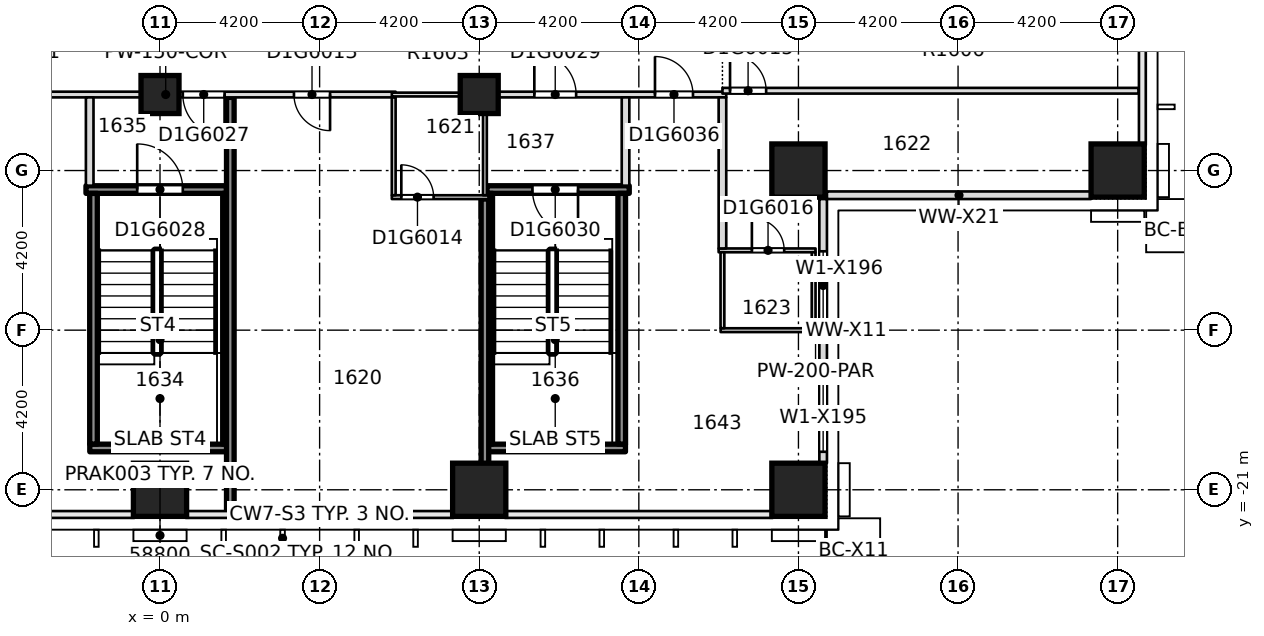
"""IFC4 building model, lengths in metres.
Left out: names, types, materials, properties, quantities, classifications, styles, units other than length and angle.
Written with IfcOpenShell. Run it as: python <this file> out.ifc"""

import sys

from ifc_helpers import new_model, si_unit, direction, frame, frame_2d, origin, origin_2d, place, context, subcontext, project, spatial, rectangle, extrude, element, fill, save


model = new_model("IFC4")
c1 = context("Model", 3, precision=1e-05, world=origin(), true_north=direction((0.0, 1.0)))
c2 = subcontext(c1, "Body", "Model", "MODEL_VIEW")
j1 = project(units=[si_unit("LENGTHUNIT", "METRE"), si_unit("PLANEANGLEUNIT", "RADIAN")], contexts=[c1])
p1 = place(None, origin())
s1 = spatial("IfcSite", under=j1, at=p1, CompositionType="ELEMENT")
p2 = place(p1, origin())
s2 = spatial("IfcBuilding", under=s1, at=p2, CompositionType="ELEMENT")
p3 = place(p2, frame((0.0, 0.0, 69.0)))
s3 = spatial("IfcBuildingStorey", under=s2, at=p3, CompositionType="ELEMENT", Elevation=69.0)
for number, where, z_axis, x_axis in (
    (1, (0.0, -21.0, -0.32), (0.0, 0.0, 1.0), (1.0, 0.0, 0.0)),
    (2, (8.4, -21.0, -0.32), (0.0, 0.0, 1.0), (1.0, 0.0, 0.0)),
    (3, (16.8, -21.0, -0.32), (0.0, 0.0, 1.0), (1.0, 0.0, 0.0)),
    (4, (16.8, -12.6, -0.32), (0.0, 0.0, 1.0), (1.0, 0.0, 0.0)),
    (5, (25.2, -12.6, -0.32), (0.0, 0.0, 1.0), (1.0, 0.0, 0.0)),
):
    element("IfcColumn", number, at=place(p3, frame(where, z_axis=z_axis, x_axis=x_axis)), inside=s3, PredefinedType="COLUMN", context=c2, shape_type="SweptSolid", body=[
        extrude(rectangle(XDim=1.4, YDim=1.4, at=origin_2d()), origin(), (0.0, 0.0, 1.0), 3.45),
    ])
for number, where, z_axis, x_axis in (
    (6, (0.0, -10.6, -0.32), (0.0, 0.0, 1.0), (1.0, 0.0, 0.0)),
    (7, (8.4, -10.6, -0.32), (0.0, 0.0, 1.0), (1.0, 0.0, 0.0)),
):
    element("IfcColumn", number, at=place(p3, frame(where, z_axis=z_axis, x_axis=x_axis)), inside=s3, PredefinedType="COLUMN", context=c2, shape_type="SweptSolid", body=[
        extrude(rectangle(XDim=1.0, YDim=1.0, at=origin_2d()), origin(), (0.0, 0.0, 1.0), 3.45),
    ])
p4 = place(p3, frame((-1.848, -19.9, 0.0), z_axis=(0.0, 0.0, 1.0), x_axis=(1.0, 0.0, 0.0)))
e8 = element("IfcWall", 8, at=p4, inside=s3, PredefinedType="SOLIDWALL", context=c2, shape_type="SweptSolid", body=[
    extrude(rectangle(XDim=3.696, YDim=0.2, at=frame_2d((1.848, 0.0))), origin(), (0.0, 0.0, 1.0), 3.13),
])
p5 = place(p3, frame((8.552, -19.9, 0.0), z_axis=(0.0, 0.0, 1.0), x_axis=(1.0, 0.0, 0.0)))
e9 = element("IfcWall", 9, at=p5, inside=s3, PredefinedType="SOLIDWALL", context=c2, shape_type="SweptSolid", body=[
    extrude(rectangle(XDim=3.696, YDim=0.2, at=frame_2d((1.848, 0.0))), origin(), (0.0, 0.0, 1.0), 3.13),
])
p6 = place(p3, frame((14.752, -16.8, 0.0), z_axis=(0.0, 0.0, 1.0), x_axis=(1.0, 0.0, 0.0)))
e10 = element("IfcWall", 10, at=p6, inside=s3, PredefinedType="PARTITIONING", context=c2, shape_type="SweptSolid", body=[
    extrude(rectangle(XDim=2.498, YDim=0.1, at=frame_2d((1.249, 0.0))), origin(), (0.0, 0.0, 1.0), 3.13),
])
p7 = place(p3, frame((17.15, -16.8, 0.0), z_axis=(0.0, 0.0, 1.0), x_axis=(1.0, 0.0, 0.0)))
e11 = element("IfcWall", 11, at=p7, inside=s3, PredefinedType="PARTITIONING", context=c2, shape_type="SweptSolid", body=[
    extrude(rectangle(XDim=0.2, YDim=0.2, at=frame_2d((0.1, 0.0))), origin(), (0.0, 0.0, 1.0), 3.13),
])
p8 = place(p3, frame((14.7, -14.7, 0.0), z_axis=(0.0, 0.0, 1.0), x_axis=(1.0, 0.0, 0.0)))
e12 = element("IfcWall", 12, at=p8, inside=s3, PredefinedType="PARTITIONING", context=c2, shape_type="SweptSolid", body=[
    extrude(rectangle(XDim=2.55, YDim=0.1, at=frame_2d((1.275, 0.0))), origin(), (0.0, 0.0, 1.0), 3.13),
])
p9 = place(p8, frame((0.875, 0.0, 0.0)))
e13 = element("IfcOpeningElement", 13, at=p9, cuts=e12, PredefinedType="OPENING", context=c2, shape_type="SweptSolid", body=[
    extrude(rectangle(XDim=0.85, YDim=2.1, at=frame_2d((0.425, 1.05))), frame((0.0, 0.06, 0.0), z_axis=(0.0, -1.0, 0.0), x_axis=(1.0, 0.0, 0.0)), (0.0, 0.0, 1.0), 0.12),
])
p10 = place(p3, frame((6.1, -13.3, 0.0), z_axis=(0.0, 0.0, 1.0), x_axis=(1.0, 0.0, 0.0)))
e14 = element("IfcWall", 14, at=p10, inside=s3, PredefinedType="PARTITIONING", context=c2, shape_type="SweptSolid", body=[
    extrude(rectangle(XDim=2.55, YDim=0.1, at=frame_2d((1.275, 0.0))), origin(), (0.0, 0.0, 1.0), 3.13),
])
p11 = place(p10, frame((0.25, 0.0, 0.0)))
e15 = element("IfcOpeningElement", 15, at=p11, cuts=e14, PredefinedType="OPENING", context=c2, shape_type="SweptSolid", body=[
    extrude(rectangle(XDim=0.85, YDim=2.1, at=frame_2d((0.425, 1.05))), frame((0.0, 0.06, 0.0), z_axis=(0.0, -1.0, 0.0), x_axis=(1.0, 0.0, 0.0)), (0.0, 0.0, 1.0), 0.12),
])
p12 = place(p3, frame((-1.948, -13.1, 0.0), z_axis=(0.0, 0.0, 1.0), x_axis=(1.0, 0.0, 0.0)))
e16 = element("IfcWall", 16, at=p12, inside=s3, PredefinedType="SOLIDWALL", context=c2, shape_type="SweptSolid", body=[
    extrude(rectangle(XDim=3.696, YDim=0.2, at=frame_2d((1.848, 0.0))), origin(), (0.0, 0.0, 1.0), 3.13),
])
p13 = place(p12, frame((1.348, 0.0, 0.0)))
e17 = element("IfcOpeningElement", 17, at=p13, cuts=e16, PredefinedType="OPENING", context=c2, shape_type="SweptSolid", body=[
    extrude(rectangle(XDim=1.2, YDim=2.1, at=frame_2d((0.6, 1.05))), frame((0.0, 0.11, 0.0), z_axis=(0.0, -1.0, 0.0), x_axis=(1.0, 0.0, 0.0)), (0.0, 0.0, 1.0), 0.22),
])
p14 = place(p3, frame((8.602, -13.1, 0.0), z_axis=(0.0, 0.0, 1.0), x_axis=(1.0, 0.0, 0.0)))
e18 = element("IfcWall", 18, at=p14, inside=s3, PredefinedType="SOLIDWALL", context=c2, shape_type="SweptSolid", body=[
    extrude(rectangle(XDim=3.746, YDim=0.2, at=frame_2d((1.873, 0.0))), origin(), (0.0, 0.0, 1.0), 3.13),
])
p15 = place(p14, frame((1.198, 0.0, 0.0)))
e19 = element("IfcOpeningElement", 19, at=p15, cuts=e18, PredefinedType="OPENING", context=c2, shape_type="SweptSolid", body=[
    extrude(rectangle(XDim=1.2, YDim=2.1, at=frame_2d((0.6, 1.05))), frame((0.0, 0.11, 0.0), z_axis=(0.0, -1.0, 0.0), x_axis=(1.0, 0.0, 0.0)), (0.0, 0.0, 1.0), 0.22),
])
p16 = place(p3, frame((-5.9, -10.6, 0.0), z_axis=(0.0, 0.0, 1.0), x_axis=(1.0, 0.0, 0.0)))
e20 = element("IfcWall", 20, at=p16, inside=s3, PredefinedType="PARTITIONING", context=c2, shape_type="SweptSolid", body=[
    extrude(rectangle(XDim=12.1, YDim=0.15, at=frame_2d((6.05, 0.0))), origin(), (0.0, 0.0, 1.0), 3.13),
])
p17 = place(p16, frame((1.575, 0.0, 0.0)))
e21 = element("IfcOpeningElement", 21, at=p17, cuts=e20, PredefinedType="OPENING", context=c2, shape_type="SweptSolid", body=[
    extrude(rectangle(XDim=0.95, YDim=2.1, at=frame_2d((0.475, 1.05))), frame((0.0, 0.085, 0.0), z_axis=(0.0, -1.0, 0.0), x_axis=(1.0, 0.0, 0.0)), (0.0, 0.0, 1.0), 0.17),
])
p18 = place(p16, frame((9.425, 0.0, 0.0)))
e22 = element("IfcOpeningElement", 22, at=p18, cuts=e20, PredefinedType="OPENING", context=c2, shape_type="SweptSolid", body=[
    extrude(rectangle(XDim=0.95, YDim=2.1, at=frame_2d((0.475, 1.05))), frame((0.0, 0.085, 0.0), z_axis=(0.0, -1.0, 0.0), x_axis=(1.0, 0.0, 0.0)), (0.0, 0.0, 1.0), 0.17),
])
p19 = place(p16, frame((6.5, 0.0, 0.0)))
e23 = element("IfcOpeningElement", 23, at=p19, cuts=e20, PredefinedType="OPENING", context=c2, shape_type="SweptSolid", body=[
    extrude(rectangle(XDim=1.1, YDim=2.1, at=frame_2d((0.55, 1.05))), frame((0.0, 0.085, 0.0), z_axis=(0.0, -1.0, 0.0), x_axis=(1.0, 0.0, 0.0)), (0.0, 0.0, 1.0), 0.17),
])
p20 = place(p3, frame((6.1, -10.6, 0.0), z_axis=(0.0, 0.0, 1.0), x_axis=(1.0, 0.0, 0.0)))
e24 = element("IfcWall", 24, at=p20, inside=s3, PredefinedType="PARTITIONING", context=c2, shape_type="SweptSolid", body=[
    extrude(rectangle(XDim=2.5, YDim=0.1, at=frame_2d((1.25, 0.0))), origin(), (0.0, 0.0, 1.0), 3.13),
])
p21 = place(p3, frame((8.5, -10.6, 0.0), z_axis=(0.0, 0.0, 1.0), x_axis=(1.0, 0.0, 0.0)))
e25 = element("IfcWall", 25, at=p21, inside=s3, PredefinedType="PARTITIONING", context=c2, shape_type="SweptSolid", body=[
    extrude(rectangle(XDim=6.4, YDim=0.15, at=frame_2d((3.2, 0.0))), origin(), (0.0, 0.0, 1.0), 3.13),
])
p22 = place(p21, frame((1.35, 0.0, 0.0)))
e26 = element("IfcOpeningElement", 26, at=p22, cuts=e25, PredefinedType="OPENING", context=c2, shape_type="SweptSolid", body=[
    extrude(rectangle(XDim=1.1, YDim=2.1, at=frame_2d((0.55, 1.05))), frame((0.0, 0.085, 0.0), z_axis=(0.0, -1.0, 0.0), x_axis=(1.0, 0.0, 0.0)), (0.0, 0.0, 1.0), 0.17),
])
p23 = place(p21, frame((4.525, 0.0, 0.0)))
e27 = element("IfcOpeningElement", 27, at=p23, cuts=e25, PredefinedType="OPENING", context=c2, shape_type="SweptSolid", body=[
    extrude(rectangle(XDim=1.0, YDim=2.1, at=frame_2d((0.5, 1.05))), frame((0.0, 0.085, 0.0), z_axis=(0.0, -1.0, 0.0), x_axis=(1.0, 0.0, 0.0)), (0.0, 0.0, 1.0), 0.17),
])
p24 = place(p3, frame((14.8, -10.5, 0.0), z_axis=(0.0, 0.0, 1.0), x_axis=(1.0, 0.0, 0.0)))
e28 = element("IfcWall", 28, at=p24, inside=s3, PredefinedType="PARTITIONING", context=c2, shape_type="SweptSolid", body=[
    extrude(rectangle(XDim=10.95, YDim=0.15, at=frame_2d((5.475, 0.0))), origin(), (0.0, 0.0, 1.0), 3.13),
])
p25 = place(p24, frame((0.2, 0.0, 0.0)))
e29 = element("IfcOpeningElement", 29, at=p25, cuts=e28, PredefinedType="OPENING", context=c2, shape_type="SweptSolid", body=[
    extrude(rectangle(XDim=0.95, YDim=2.1, at=frame_2d((0.475, 1.05))), frame((0.0, 0.085, 0.0), z_axis=(0.0, -1.0, 0.0), x_axis=(1.0, 0.0, 0.0)), (0.0, 0.0, 1.0), 0.17),
])
p26 = place(p3, frame((-1.85, -12.998, 0.0), z_axis=(0.0, 0.0, 1.0), x_axis=(0.0, 1.0, 0.0)))
e30 = element("IfcWall", 30, at=p26, inside=s3, PredefinedType="PARTITIONING", context=c2, shape_type="SweptSolid", body=[
    extrude(rectangle(XDim=2.323, YDim=0.2, at=frame_2d((1.162, 0.0))), origin(), (0.0, 0.0, 1.0), 3.13),
])
for number, where, z_axis, x_axis in (
    (31, (-1.75, -19.798, 0.0), (0.0, 0.0, 1.0), (0.0, 1.0, 0.0)),
    (32, (1.75, -19.798, 0.0), (0.0, 0.0, 1.0), (0.0, 1.0, 0.0)),
):
    element("IfcWall", number, at=place(p3, frame(where, z_axis=z_axis, x_axis=x_axis)), inside=s3, PredefinedType="SOLIDWALL", context=c2, shape_type="SweptSolid", body=[
        extrude(rectangle(XDim=6.596, YDim=0.2, at=frame_2d((3.298, 0.0))), origin(), (0.0, 0.0, 1.0), 3.13),
    ])
for number, where, z_axis, x_axis in (
    (33, (6.15, -13.25, 0.0), (0.0, 0.0, 1.0), (0.0, 1.0, 0.0)),
    (34, (8.55, -13.25, 0.0), (0.0, 0.0, 1.0), (0.0, 1.0, 0.0)),
):
    element("IfcWall", number, at=place(p3, frame(where, z_axis=z_axis, x_axis=x_axis)), inside=s3, PredefinedType="PARTITIONING", context=c2, shape_type="SweptSolid", body=[
        extrude(rectangle(XDim=2.575, YDim=0.1, at=frame_2d((1.288, 0.0))), origin(), (0.0, 0.0, 1.0), 3.13),
    ])
for number, where, z_axis, x_axis in (
    (35, (8.65, -19.798, 0.0), (0.0, 0.0, 1.0), (0.0, 1.0, 0.0)),
    (36, (12.15, -19.798, 0.0), (0.0, 0.0, 1.0), (0.0, 1.0, 0.0)),
):
    element("IfcWall", number, at=place(p3, frame(where, z_axis=z_axis, x_axis=x_axis)), inside=s3, PredefinedType="SOLIDWALL", context=c2, shape_type="SweptSolid", body=[
        extrude(rectangle(XDim=6.596, YDim=0.2, at=frame_2d((3.298, 0.0))), origin(), (0.0, 0.0, 1.0), 3.13),
    ])
p27 = place(p3, frame((12.25, -12.998, 0.0), z_axis=(0.0, 0.0, 1.0), x_axis=(0.0, 1.0, 0.0)))
e37 = element("IfcWall", 37, at=p27, inside=s3, PredefinedType="PARTITIONING", context=c2, shape_type="SweptSolid", body=[
    extrude(rectangle(XDim=2.323, YDim=0.2, at=frame_2d((1.162, 0.0))), origin(), (0.0, 0.0, 1.0), 3.13),
])
p28 = place(p3, frame((14.8, -16.748, 0.0), z_axis=(0.0, 0.0, 1.0), x_axis=(0.0, 1.0, 0.0)))
e38 = element("IfcWall", 38, at=p28, inside=s3, PredefinedType="PARTITIONING", context=c2, shape_type="SweptSolid", body=[
    extrude(rectangle(XDim=1.998, YDim=0.1, at=frame_2d((0.999, 0.0))), origin(), (0.0, 0.0, 1.0), 3.13),
])
p29 = place(p3, frame((14.8, -14.65, 0.0), z_axis=(0.0, 0.0, 1.0), x_axis=(0.0, 1.0, 0.0)))
e39 = element("IfcWall", 39, at=p29, inside=s3, PredefinedType="PARTITIONING", context=c2, shape_type="SweptSolid", body=[
    extrude(rectangle(XDim=3.975, YDim=0.2, at=frame_2d((1.987, 0.0))), origin(), (0.0, 0.0, 1.0), 3.13),
])
p30 = place(p3, frame((17.2, -16.7, 0.0), z_axis=(0.0, 0.0, 1.0), x_axis=(0.0, 1.0, 0.0)))
e40 = element("IfcWall", 40, at=p30, inside=s3, PredefinedType="PARTITIONING", context=c2, shape_type="SweptSolid", body=[
    extrude(rectangle(XDim=1.95, YDim=0.1, at=frame_2d((0.975, 0.0))), origin(), (0.0, 0.0, 1.0), 3.13),
])
p31 = place(p3, frame((17.45, -20.3, 0.0), z_axis=(0.0, 0.0, 1.0), x_axis=(0.0, 1.0, 0.0)))
e41 = element("IfcWall", 41, at=p31, inside=s3, PredefinedType="STANDARD", context=c2, shape_type="SweptSolid", body=[
    extrude(rectangle(XDim=6.95, YDim=0.2, at=frame_2d((3.475, 0.0))), origin(), (0.0, 0.0, 1.0), 3.13),
])
p32 = place(p31, frame((0.3, 0.0, 0.2)))
e42 = element("IfcOpeningElement", 42, at=p32, cuts=e41, PredefinedType="OPENING", context=c2, shape_type="SweptSolid", body=[
    extrude(rectangle(XDim=1.8, YDim=2.65, at=frame_2d((0.9, 1.325))), frame((0.0, 0.11, 0.0), z_axis=(0.0, -1.0, 0.0), x_axis=(1.0, 0.0, 0.0)), (0.0, 0.0, 1.0), 0.22),
])
p33 = place(p31, frame((3.775, 0.0, 0.2)))
e43 = element("IfcOpeningElement", 43, at=p33, cuts=e41, PredefinedType="OPENING", context=c2, shape_type="SweptSolid", body=[
    extrude(rectangle(XDim=1.8, YDim=2.65, at=frame_2d((0.9, 1.325))), frame((0.0, 0.11, 0.0), z_axis=(0.0, -1.0, 0.0), x_axis=(1.0, 0.0, 0.0)), (0.0, 0.0, 1.0), 0.22),
])
p34 = place(p3, frame((17.55, -13.25, 0.0), z_axis=(0.0, 0.0, 1.0), x_axis=(1.0, 0.0, 0.0)))
e44 = element("IfcWall", 44, at=p34, inside=s3, PredefinedType="STANDARD", context=c2, shape_type="SweptSolid", body=[
    extrude(rectangle(XDim=6.95, YDim=0.2, at=frame_2d((3.475, 0.0))), origin(), (0.0, 0.0, 1.0), 3.13),
])
p35 = place(p3, frame((8.55, -21.55, 0.0), z_axis=(0.0, 0.0, 1.0), x_axis=(0.0, 1.0, 0.0)))
e45 = element("IfcWall", 45, at=p35, inside=s3, PredefinedType="SOLIDWALL", context=c2, shape_type="SweptSolid", body=[
    extrude(rectangle(XDim=8.2, YDim=0.2, at=frame_2d((4.1, 0.0))), origin(), (0.0, 0.0, 1.0), 3.13),
])
p36 = place(p3, frame((1.85, -21.55, 0.0), z_axis=(0.0, 0.0, 1.0), x_axis=(0.0, 1.0, 0.0)))
e46 = element("IfcWall", 46, at=p36, inside=s3, PredefinedType="SOLIDWALL", context=c2, shape_type="SweptSolid", body=[
    extrude(rectangle(XDim=10.875, YDim=0.2, at=frame_2d((5.438, 0.0))), origin(), (0.0, 0.0, 1.0), 3.13),
])
p37 = place(p18, origin())
e47 = element("IfcDoor", 47, at=p37, inside=s3, OperationType="SINGLE_SWING_RIGHT", PredefinedType="DOOR", context=c2, shape_type="SweptSolid", body=[
    extrude(rectangle(XDim=0.95, YDim=2.1, at=frame_2d((0.475, 1.05))), frame((0.0, 0.025, 0.0), z_axis=(0.0, -1.0, 0.0), x_axis=(1.0, 0.0, 0.0)), (0.0, 0.0, 1.0), 0.05),
])
fill(e22, e47)
p38 = place(p11, origin())
e48 = element("IfcDoor", 48, at=p38, inside=s3, OperationType="SINGLE_SWING_LEFT", PredefinedType="DOOR", context=c2, shape_type="SweptSolid", body=[
    extrude(rectangle(XDim=0.85, YDim=2.1, at=frame_2d((0.425, 1.05))), frame((0.0, 0.025, 0.0), z_axis=(0.0, -1.0, 0.0), x_axis=(1.0, 0.0, 0.0)), (0.0, 0.0, 1.0), 0.05),
])
fill(e15, e48)
p39 = place(p25, origin())
e49 = element("IfcDoor", 49, at=p39, inside=s3, OperationType="SINGLE_SWING_RIGHT", PredefinedType="DOOR", context=c2, shape_type="SweptSolid", body=[
    extrude(rectangle(XDim=0.95, YDim=2.1, at=frame_2d((0.475, 1.05))), frame((0.0, 0.025, 0.0), z_axis=(0.0, -1.0, 0.0), x_axis=(1.0, 0.0, 0.0)), (0.0, 0.0, 1.0), 0.05),
])
fill(e29, e49)
p40 = place(p9, origin())
e50 = element("IfcDoor", 50, at=p40, inside=s3, OperationType="SINGLE_SWING_RIGHT", PredefinedType="DOOR", context=c2, shape_type="SweptSolid", body=[
    extrude(rectangle(XDim=0.85, YDim=2.1, at=frame_2d((0.425, 1.05))), frame((0.0, 0.025, 0.0), z_axis=(0.0, -1.0, 0.0), x_axis=(1.0, 0.0, 0.0)), (0.0, 0.0, 1.0), 0.05),
])
fill(e13, e50)
p41 = place(p19, origin())
e51 = element("IfcDoor", 51, at=p41, inside=s3, OperationType="SINGLE_SWING_LEFT", PredefinedType="DOOR", context=c2, shape_type="SweptSolid", body=[
    extrude(rectangle(XDim=1.1, YDim=2.1, at=frame_2d((0.55, 1.05))), frame((0.0, 0.025, 0.0), z_axis=(0.0, -1.0, 0.0), x_axis=(1.0, 0.0, 0.0)), (0.0, 0.0, 1.0), 0.05),
])
fill(e23, e51)
p42 = place(p13, origin())
e52 = element("IfcDoor", 52, at=p42, inside=s3, OperationType="SINGLE_SWING_RIGHT", PredefinedType="DOOR", context=c2, shape_type="SweptSolid", body=[
    extrude(rectangle(XDim=1.2, YDim=2.1, at=frame_2d((0.6, 1.05))), frame((0.0, 0.025, 0.0), z_axis=(0.0, -1.0, 0.0), x_axis=(1.0, 0.0, 0.0)), (0.0, 0.0, 1.0), 0.05),
])
fill(e17, e52)
p43 = place(p22, origin())
e53 = element("IfcDoor", 53, at=p43, inside=s3, OperationType="SINGLE_SWING_RIGHT", PredefinedType="DOOR", context=c2, shape_type="SweptSolid", body=[
    extrude(rectangle(XDim=1.1, YDim=2.1, at=frame_2d((0.55, 1.05))), frame((0.0, 0.025, 0.0), z_axis=(0.0, -1.0, 0.0), x_axis=(1.0, 0.0, 0.0)), (0.0, 0.0, 1.0), 0.05),
])
fill(e26, e53)
p44 = place(p15, origin())
e54 = element("IfcDoor", 54, at=p44, inside=s3, OperationType="SINGLE_SWING_RIGHT", PredefinedType="DOOR", context=c2, shape_type="SweptSolid", body=[
    extrude(rectangle(XDim=1.2, YDim=2.1, at=frame_2d((0.6, 1.05))), frame((0.0, 0.025, 0.0), z_axis=(0.0, -1.0, 0.0), x_axis=(1.0, 0.0, 0.0)), (0.0, 0.0, 1.0), 0.05),
])
fill(e19, e54)
p45 = place(p23, origin())
e55 = element("IfcDoor", 55, at=p45, inside=s3, OperationType="SINGLE_SWING_RIGHT", PredefinedType="DOOR", context=c2, shape_type="SweptSolid", body=[
    extrude(rectangle(XDim=1.0, YDim=2.1, at=frame_2d((0.5, 1.05))), frame((0.0, 0.025, 0.0), z_axis=(0.0, -1.0, 0.0), x_axis=(1.0, 0.0, 0.0)), (0.0, 0.0, 1.0), 0.05),
])
fill(e27, e55)
p46 = place(p32, origin())
e56 = element("IfcWindow", 56, at=p46, inside=s3, PartitioningType="SINGLE_PANEL", PredefinedType="WINDOW", context=c2, shape_type="SweptSolid", body=[
    extrude(rectangle(XDim=1.8, YDim=2.65, at=frame_2d((0.9, 1.325))), frame((0.0, 0.03, 0.0), z_axis=(0.0, -1.0, 0.0), x_axis=(1.0, 0.0, 0.0)), (0.0, 0.0, 1.0), 0.06),
])
fill(e42, e56)
p47 = place(p33, origin())
e57 = element("IfcWindow", 57, at=p47, inside=s3, PartitioningType="SINGLE_PANEL", PredefinedType="WINDOW", context=c2, shape_type="SweptSolid", body=[
    extrude(rectangle(XDim=1.8, YDim=2.65, at=frame_2d((0.9, 1.325))), frame((0.0, 0.03, 0.0), z_axis=(0.0, -1.0, 0.0), x_axis=(1.0, 0.0, 0.0)), (0.0, 0.0, 1.0), 0.06),
])
fill(e43, e57)
save(model, sys.argv[1])
